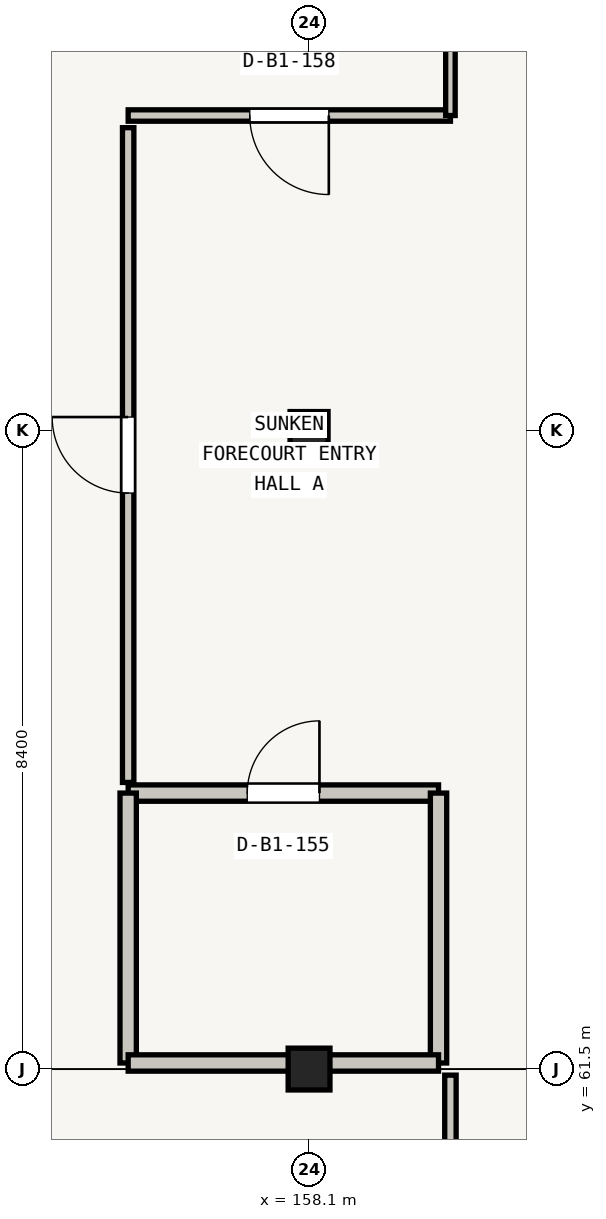
"""IFC4 building model, lengths in metres.
Left out: names, types, materials, properties, quantities, classifications, styles, units other than length and angle.
Written with IfcOpenShell. Run it as: python <this file> out.ifc"""

import sys

from ifc_helpers import new_model, si_unit, direction, frame, frame_2d, origin, origin_2d, place, context, subcontext, project, spatial, rectangle, extrude, element, fill, save


model = new_model("IFC4")
c1 = context("Model", 3, precision=1e-05, world=origin(), true_north=direction((0.0, 1.0)))
c2 = subcontext(c1, "Body", "Model", "MODEL_VIEW")
j1 = project(units=[si_unit("LENGTHUNIT", "METRE"), si_unit("PLANEANGLEUNIT", "RADIAN")], contexts=[c1])
p1 = place(None, origin())
s1 = spatial("IfcSite", under=j1, at=p1, CompositionType="ELEMENT")
p2 = place(p1, origin())
s2 = spatial("IfcBuilding", under=s1, at=p2, CompositionType="ELEMENT")
p3 = place(p2, frame((0.0, 0.0, -4.5)))
s3 = spatial("IfcBuildingStorey", under=s2, at=p3, CompositionType="ELEMENT", Elevation=-4.5)
p4 = place(p3, frame((158.1, 61.5, -0.42), z_axis=(0.0, 0.0, 1.0), x_axis=(1.0, 0.0, 0.0)))
e1 = element("IfcColumn", 1, at=p4, inside=s3, PredefinedType="COLUMN", context=c2, shape_type="SweptSolid", body=[
    extrude(rectangle(XDim=0.55, YDim=0.55, at=origin_2d()), origin(), (0.0, 0.0, 1.0), 4.67),
])
p5 = place(p3, frame((158.1, 69.9, -0.42), z_axis=(0.0, 0.0, 1.0), x_axis=(1.0, 0.0, 0.0)))
e2 = element("IfcColumn", 2, at=p5, inside=s3, PredefinedType="COLUMN", context=c2, shape_type="SweptSolid", body=[
    extrude(rectangle(XDim=0.5, YDim=0.5, at=origin_2d()), origin(), (0.0, 0.0, 1.0), 4.67),
])
p6 = place(p3, frame((155.72, 65.131, 0.0), z_axis=(0.0, 0.0, 1.0), x_axis=(1.0, 0.0, 0.0)))
e3 = element("IfcWall", 3, at=p6, inside=s3, PredefinedType="PLUMBINGWALL", context=c2, shape_type="SweptSolid", body=[
    extrude(rectangle(XDim=4.083, YDim=0.215, at=frame_2d((2.042, 0.0))), origin(), (0.0, 0.0, 1.0), 3.27),
])
p7 = place(p6, frame((1.567, 0.0, 0.0)))
e4 = element("IfcOpeningElement", 4, at=p7, cuts=e3, PredefinedType="OPENING", context=c2, shape_type="SweptSolid", body=[
    extrude(rectangle(XDim=0.95, YDim=2.05, at=frame_2d((0.475, 1.025))), frame((0.0, 0.107, 0.0), z_axis=(0.0, -1.0, 0.0), x_axis=(1.0, 0.0, 0.0)), (0.0, 0.0, 1.0), 0.215),
])
for number, where, z_axis, x_axis in (
    (5, (155.72, 61.58, 0.0), (0.0, 0.0, 1.0), (0.0, 1.0, 0.0)),
    (6, (159.803, 65.131, 0.0), (0.0, 0.0, 1.0), (0.0, -1.0, 0.0)),
):
    element("IfcWall", number, at=place(p3, frame(where, z_axis=z_axis, x_axis=x_axis)), inside=s3, PredefinedType="PLUMBINGWALL", context=c2, shape_type="SweptSolid", body=[
        extrude(rectangle(XDim=3.551, YDim=0.215, at=frame_2d((1.775, 0.0))), origin(), (0.0, 0.0, 1.0), 3.27),
    ])
p8 = place(p3, frame((159.803, 61.58, 0.0), z_axis=(0.0, 0.0, 1.0), x_axis=(-1.0, 0.0, 0.0)))
e7 = element("IfcWall", 7, at=p8, inside=s3, PredefinedType="PLUMBINGWALL", context=c2, shape_type="SweptSolid", body=[
    extrude(rectangle(XDim=4.083, YDim=0.215, at=frame_2d((2.042, 0.0))), origin(), (0.0, 0.0, 1.0), 3.27),
])
p9 = place(p3, frame((159.96, 61.42, 0.0), z_axis=(0.0, 0.0, 1.0), x_axis=(0.0, -1.0, 0.0)))
e8 = element("IfcWall", 8, at=p9, inside=s3, PredefinedType="PARTITIONING", context=c2, shape_type="SweptSolid", body=[
    extrude(rectangle(XDim=16.37, YDim=0.15, at=frame_2d((8.185, 0.0))), origin(), (0.0, 0.0, 1.0), 3.27),
])
p10 = place(p9, frame((7.665, 0.0, 0.0)))
e9 = element("IfcOpeningElement", 9, at=p10, cuts=e8, PredefinedType="OPENING", context=c2, shape_type="SweptSolid", body=[
    extrude(rectangle(XDim=1.04, YDim=2.05, at=frame_2d((0.52, 1.025))), frame((0.0, 0.075, 0.0), z_axis=(0.0, -1.0, 0.0), x_axis=(1.0, 0.0, 0.0)), (0.0, 0.0, 1.0), 0.15),
])
p11 = place(p3, frame((159.96, 74.045, 0.0), z_axis=(0.0, 0.0, 1.0), x_axis=(-1.0, 0.0, 0.0)))
e10 = element("IfcWall", 10, at=p11, inside=s3, PredefinedType="PARTITIONING", context=c2, shape_type="SweptSolid", body=[
    extrude(rectangle(XDim=4.24, YDim=0.15, at=frame_2d((2.12, 0.0))), origin(), (0.0, 0.0, 1.0), 3.27),
])
p12 = place(p11, frame((1.6, 0.0, 0.0)))
e11 = element("IfcOpeningElement", 11, at=p12, cuts=e10, PredefinedType="OPENING", context=c2, shape_type="SweptSolid", body=[
    extrude(rectangle(XDim=1.04, YDim=2.05, at=frame_2d((0.52, 1.025))), frame((0.0, 0.075, 0.0), z_axis=(0.0, -1.0, 0.0), x_axis=(1.0, 0.0, 0.0)), (0.0, 0.0, 1.0), 0.15),
])
p13 = place(p3, frame((159.96, 79.4, 0.0), z_axis=(0.0, 0.0, 1.0), x_axis=(0.0, -1.0, 0.0)))
e12 = element("IfcWall", 12, at=p13, inside=s3, PredefinedType="PARTITIONING", context=c2, shape_type="SweptSolid", body=[
    extrude(rectangle(XDim=5.355, YDim=0.125, at=frame_2d((2.677, 0.0))), origin(), (0.0, 0.0, 1.0), 3.27),
])
p14 = place(p3, frame((155.72, 65.271, 0.0), z_axis=(0.0, 0.0, 1.0), x_axis=(0.0, 1.0, 0.0)))
e13 = element("IfcWall", 13, at=p14, inside=s3, PredefinedType="PARTITIONING", context=c2, shape_type="SweptSolid", body=[
    extrude(rectangle(XDim=8.614, YDim=0.15, at=frame_2d((4.307, 0.0))), origin(), (0.0, 0.0, 1.0), 3.27),
])
p15 = place(p14, frame((3.807, 0.0, 0.0)))
e14 = element("IfcOpeningElement", 14, at=p15, cuts=e13, PredefinedType="OPENING", context=c2, shape_type="SweptSolid", body=[
    extrude(rectangle(XDim=1.0, YDim=2.05, at=frame_2d((0.5, 1.025))), frame((0.0, 0.075, 0.0), z_axis=(0.0, -1.0, 0.0), x_axis=(1.0, 0.0, 0.0)), (0.0, 0.0, 1.0), 0.15),
])
p16 = place(p7, origin())
e15 = element("IfcDoor", 15, at=p16, inside=s3, OperationType="SINGLE_SWING_RIGHT", PredefinedType="DOOR", context=c2, shape_type="SweptSolid", body=[
    extrude(rectangle(XDim=0.95, YDim=2.05, at=frame_2d((0.475, 1.025))), frame((0.0, 0.025, 0.0), z_axis=(0.0, -1.0, 0.0), x_axis=(1.0, 0.0, 0.0)), (0.0, 0.0, 1.0), 0.05),
])
fill(e4, e15)
p17 = place(p12, origin())
e16 = element("IfcDoor", 16, at=p17, inside=s3, OperationType="SINGLE_SWING_LEFT", PredefinedType="DOOR", context=c2, shape_type="SweptSolid", body=[
    extrude(rectangle(XDim=1.04, YDim=2.05, at=frame_2d((0.52, 1.025))), frame((0.0, 0.025, 0.0), z_axis=(0.0, -1.0, 0.0), x_axis=(1.0, 0.0, 0.0)), (0.0, 0.0, 1.0), 0.05),
])
fill(e11, e16)
p18 = place(p15, origin())
e17 = element("IfcDoor", 17, at=p18, inside=s3, OperationType="SINGLE_SWING_RIGHT", PredefinedType="DOOR", context=c2, shape_type="SweptSolid", body=[
    extrude(rectangle(XDim=1.0, YDim=2.05, at=frame_2d((0.5, 1.025))), frame((0.0, 0.025, 0.0), z_axis=(0.0, -1.0, 0.0), x_axis=(1.0, 0.0, 0.0)), (0.0, 0.0, 1.0), 0.05),
])
fill(e14, e17)
save(model, sys.argv[1])
